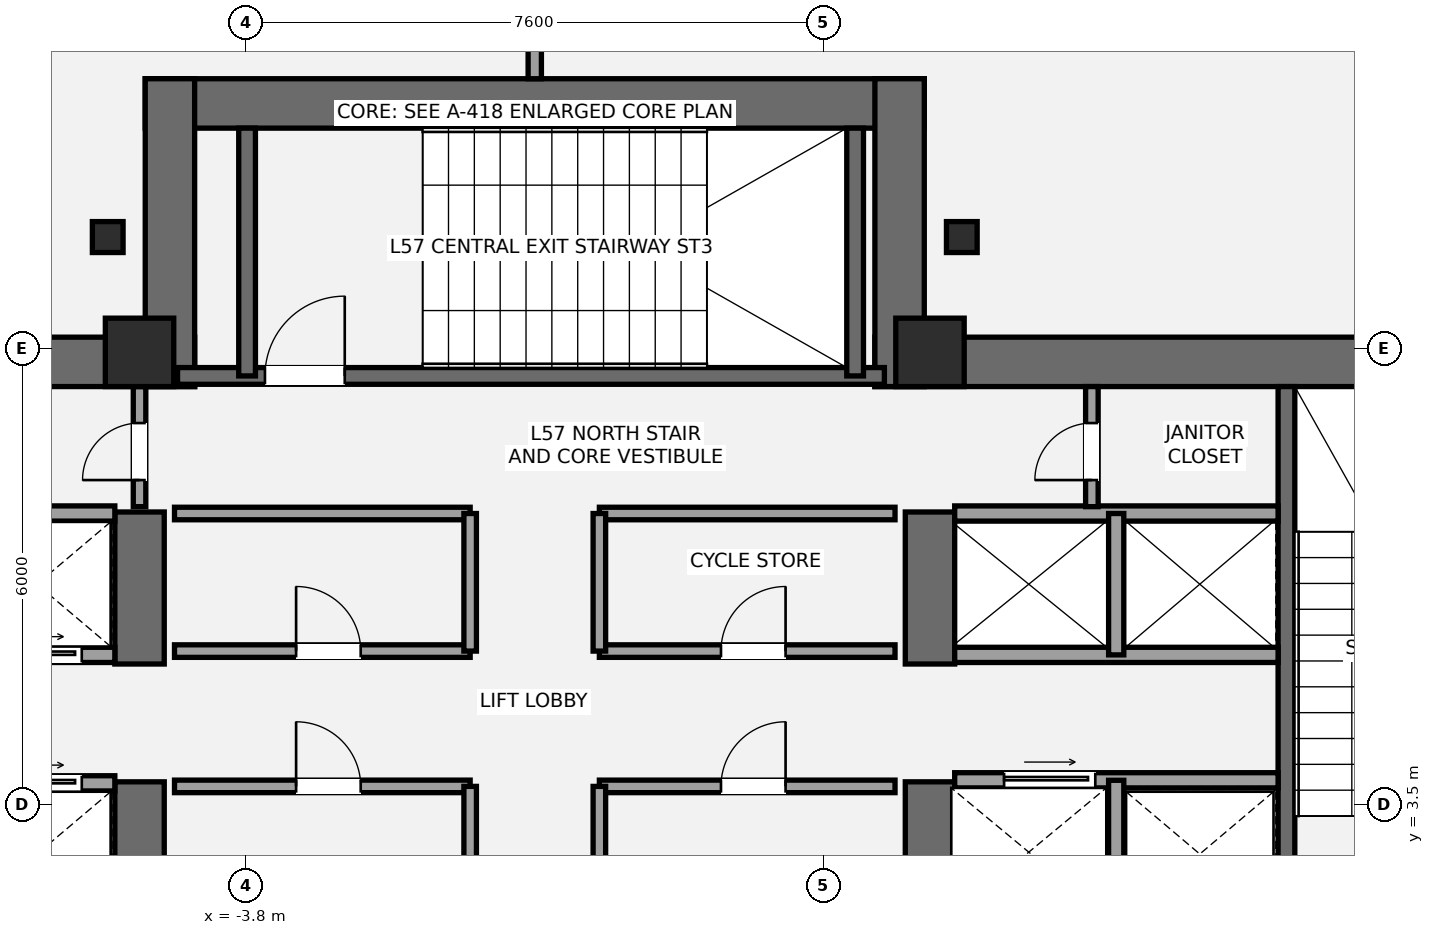
"""IFC4 building model, lengths in metres.
Left out: names, types, materials, properties, quantities, classifications, styles, units other than length and angle.
Written with IfcOpenShell. Run it as: python <this file> out.ifc"""

import sys

from ifc_helpers import new_model, si_unit, direction, frame, frame_2d, origin, origin_2d, place, context, subcontext, project, spatial, rectangle, i_section, extrude, element, fill, save


model = new_model("IFC4")
c1 = context("Model", 3, precision=1e-05, world=origin(), true_north=direction((0.0, 1.0)))
c2 = subcontext(c1, "Body", "Model", "MODEL_VIEW")
j1 = project(units=[si_unit("LENGTHUNIT", "METRE"), si_unit("PLANEANGLEUNIT", "RADIAN")], contexts=[c1])
p1 = place(None, origin())
s1 = spatial("IfcSite", under=j1, at=p1, CompositionType="ELEMENT")
p2 = place(p1, origin())
s2 = spatial("IfcBuilding", under=s1, at=p2, CompositionType="ELEMENT")
p3 = place(p2, frame((0.0, 0.0, 205.9)))
s3 = spatial("IfcBuildingStorey", under=s2, at=p3, CompositionType="ELEMENT", Elevation=205.9)
p4 = place(p3, frame((-13.8, 9.325, 0.0), z_axis=(0.0, 0.0, 1.0), x_axis=(1.0, 0.0, 0.0)))
e1 = element("IfcWall", 1, at=p4, inside=s3, PredefinedType="SHEAR", context=c2, shape_type="SweptSolid", body=[
    extrude(rectangle(XDim=9.325, YDim=0.65, at=frame_2d((4.663, 0.0))), origin(), (0.0, 0.0, 1.0), 4.1),
])
p5 = place(p3, frame((-5.2, 1.2, 0.0), z_axis=(0.0, 0.0, 1.0), x_axis=(0.0, 1.0, 0.0)))
e2 = element("IfcWall", 2, at=p5, inside=s3, PredefinedType="SHEAR", context=c2, shape_type="SweptSolid", body=[
    extrude(rectangle(XDim=2.6, YDim=0.65, at=frame_2d((1.3, 0.0))), origin(), (0.0, 0.0, 1.0), 4.1),
])
p6 = place(p3, frame((-5.2, 5.35, 0.0), z_axis=(0.0, 0.0, 1.0), x_axis=(0.0, 1.0, 0.0)))
e3 = element("IfcWall", 3, at=p6, inside=s3, PredefinedType="SHEAR", context=c2, shape_type="SweptSolid", body=[
    extrude(rectangle(XDim=2.0, YDim=0.65, at=frame_2d((1.0, 0.0))), origin(), (0.0, 0.0, 1.0), 4.1),
])
p7 = place(p3, frame((4.475, 9.325, 0.0), z_axis=(0.0, 0.0, 1.0), x_axis=(1.0, 0.0, 0.0)))
e4 = element("IfcWall", 4, at=p7, inside=s3, PredefinedType="SHEAR", context=c2, shape_type="SweptSolid", body=[
    extrude(rectangle(XDim=9.325, YDim=0.65, at=frame_2d((4.663, 0.0))), origin(), (0.0, 0.0, 1.0), 4.1),
])
p8 = place(p3, frame((5.2, 1.2, 0.0), z_axis=(0.0, 0.0, 1.0), x_axis=(0.0, 1.0, 0.0)))
e5 = element("IfcWall", 5, at=p8, inside=s3, PredefinedType="SHEAR", context=c2, shape_type="SweptSolid", body=[
    extrude(rectangle(XDim=2.6, YDim=0.65, at=frame_2d((1.3, 0.0))), origin(), (0.0, 0.0, 1.0), 4.1),
])
p9 = place(p3, frame((5.2, 5.35, 0.0), z_axis=(0.0, 0.0, 1.0), x_axis=(0.0, 1.0, 0.0)))
e6 = element("IfcWall", 6, at=p9, inside=s3, PredefinedType="SHEAR", context=c2, shape_type="SweptSolid", body=[
    extrude(rectangle(XDim=2.0, YDim=0.65, at=frame_2d((1.0, 0.0))), origin(), (0.0, 0.0, 1.0), 4.1),
])
p10 = place(p3, frame((9.89, 1.85, 0.0), z_axis=(0.0, 0.0, 1.0), x_axis=(0.0, 1.0, 0.0)))
e7 = element("IfcWall", 7, at=p10, inside=s3, PredefinedType="SHEAR", context=c2, shape_type="SweptSolid", body=[
    extrude(rectangle(XDim=7.15, YDim=0.22, at=frame_2d((3.575, 0.0))), origin(), (0.0, 0.0, 1.0), 4.1),
])
p11 = place(p3, frame((-5.125, 12.725, 0.0), z_axis=(0.0, 0.0, 1.0), x_axis=(1.0, 0.0, 0.0)))
e8 = element("IfcWall", 8, at=p11, inside=s3, PredefinedType="SHEAR", context=c2, shape_type="SweptSolid", body=[
    extrude(rectangle(XDim=10.25, YDim=0.65, at=frame_2d((5.125, 0.0))), origin(), (0.0, 0.0, 1.0), 4.1),
])
for number, where, z_axis, x_axis in (
    (9, (-4.8, 9.0, 0.0), (0.0, 0.0, 1.0), (0.0, 1.0, 0.0)),
    (10, (4.8, 9.0, 0.0), (0.0, 0.0, 1.0), (0.0, 1.0, 0.0)),
):
    element("IfcWall", number, at=place(p3, frame(where, z_axis=z_axis, x_axis=x_axis)), inside=s3, PredefinedType="SHEAR", context=c2, shape_type="SweptSolid", body=[
        extrude(rectangle(XDim=4.05, YDim=0.65, at=frame_2d((2.025, 0.0))), origin(), (0.0, 0.0, 1.0), 4.1),
    ])
p12 = place(p3, frame((-4.7, 9.14, 0.0), z_axis=(0.0, 0.0, 1.0), x_axis=(1.0, 0.0, 0.0)))
e11 = element("IfcWall", 11, at=p12, inside=s3, PredefinedType="SHEAR", context=c2, shape_type="SweptSolid", body=[
    extrude(rectangle(XDim=9.3, YDim=0.22, at=frame_2d((4.65, 0.0))), origin(), (0.0, 0.0, 1.0), 4.1),
])
p13 = place(p12, frame((1.15, 0.0, 0.0)))
e12 = element("IfcOpeningElement", 12, at=p13, cuts=e11, PredefinedType="OPENING", context=c2, shape_type="SweptSolid", body=[
    extrude(rectangle(XDim=1.05, YDim=2.15, at=frame_2d((0.525, 1.075))), frame((0.0, 0.12, 0.0), z_axis=(0.0, -1.0, 0.0), x_axis=(1.0, 0.0, 0.0)), (0.0, 0.0, 1.0), 0.24),
])
for number, where, z_axis, x_axis in (
    (13, (-3.785, 9.14, 0.0), (0.0, 0.0, 1.0), (0.0, 1.0, 0.0)),
    (14, (4.215, 9.14, 0.0), (0.0, 0.0, 1.0), (0.0, 1.0, 0.0)),
):
    element("IfcWall", number, at=place(p3, frame(where, z_axis=z_axis, x_axis=x_axis)), inside=s3, PredefinedType="SHEAR", context=c2, shape_type="SweptSolid", body=[
        extrude(rectangle(XDim=3.26, YDim=0.22, at=frame_2d((1.63, 0.0))), origin(), (0.0, 0.0, 1.0), 4.1),
    ])
for number, where, z_axis, x_axis in (
    (15, (-5.2, 9.45, 0.0), (0.0, 0.0, 1.0), (1.0, 0.0, 0.0)),
    (16, (5.2, 9.45, 0.0), (0.0, 0.0, 1.0), (1.0, 0.0, 0.0)),
):
    element("IfcColumn", number, at=place(p3, frame(where, z_axis=z_axis, x_axis=x_axis)), inside=s3, PredefinedType="COLUMN", context=c2, shape_type="SweptSolid", body=[
        extrude(rectangle(XDim=0.9, YDim=0.9, at=origin_2d()), origin(), (0.0, 0.0, 1.0), 4.1),
    ])
for number, where, z_axis, x_axis in (
    (17, (5.619, 10.967, 0.0), (0.0, 0.0, 1.0), (1.0, 0.0, 0.0)),
    (18, (-5.619, 10.967, 0.0), (0.0, 0.0, 1.0), (1.0, 0.0, 0.0)),
):
    element("IfcColumn", number, at=place(p3, frame(where, z_axis=z_axis, x_axis=x_axis)), inside=s3, PredefinedType="COLUMN", context=c2, shape_type="SweptSolid", body=[
        extrude(i_section(OverallWidth=0.404, OverallDepth=0.407, WebThickness=0.027, FlangeThickness=0.044, at=origin_2d()), origin(), (0.0, 0.0, 1.0), 4.1),
    ])
p14 = place(p3, frame((-9.78, 3.78, 0.0), z_axis=(0.0, 0.0, 1.0), x_axis=(1.0, 0.0, 0.0)))
e19 = element("IfcWall", 19, at=p14, inside=s3, PredefinedType="SOLIDWALL", context=c2, shape_type="SweptSolid", body=[
    extrude(rectangle(XDim=4.255, YDim=0.2, at=frame_2d((2.127, 0.0))), origin(), (0.0, 0.0, 1.0), 3.92),
])
p15 = place(p14, frame((2.72, 0.0, 0.0)))
e20 = element("IfcOpeningElement", 20, at=p15, cuts=e19, PredefinedType="OPENING", context=c2, shape_type="SweptSolid", body=[
    extrude(rectangle(XDim=1.1, YDim=2.2, at=frame_2d((0.55, 1.1))), frame((0.0, 0.11, 0.0), z_axis=(0.0, -1.0, 0.0), x_axis=(1.0, 0.0, 0.0)), (0.0, 0.0, 1.0), 0.22),
])
p16 = place(p3, frame((-9.78, 5.47, 0.0), z_axis=(0.0, 0.0, 1.0), x_axis=(1.0, 0.0, 0.0)))
e21 = element("IfcWall", 21, at=p16, inside=s3, PredefinedType="SOLIDWALL", context=c2, shape_type="SweptSolid", body=[
    extrude(rectangle(XDim=4.255, YDim=0.2, at=frame_2d((2.127, 0.0))), origin(), (0.0, 0.0, 1.0), 3.92),
])
p17 = place(p16, frame((0.55, 0.0, 0.0)))
e22 = element("IfcOpeningElement", 22, at=p17, cuts=e21, PredefinedType="OPENING", context=c2, shape_type="SweptSolid", body=[
    extrude(rectangle(XDim=1.1, YDim=2.2, at=frame_2d((0.55, 1.1))), frame((0.0, 0.11, 0.0), z_axis=(0.0, -1.0, 0.0), x_axis=(1.0, 0.0, 0.0)), (0.0, 0.0, 1.0), 0.22),
])
p18 = place(p16, frame((2.72, 0.0, 0.0)))
e23 = element("IfcOpeningElement", 23, at=p18, cuts=e21, PredefinedType="OPENING", context=c2, shape_type="SweptSolid", body=[
    extrude(rectangle(XDim=1.1, YDim=2.2, at=frame_2d((0.55, 1.1))), frame((0.0, 0.11, 0.0), z_axis=(0.0, -1.0, 0.0), x_axis=(1.0, 0.0, 0.0)), (0.0, 0.0, 1.0), 0.22),
])
p19 = place(p3, frame((-9.78, 7.33, 0.0), z_axis=(0.0, 0.0, 1.0), x_axis=(1.0, 0.0, 0.0)))
e24 = element("IfcWall", 24, at=p19, inside=s3, PredefinedType="SOLIDWALL", context=c2, shape_type="SweptSolid", body=[
    extrude(rectangle(XDim=4.255, YDim=0.2, at=frame_2d((2.127, 0.0))), origin(), (0.0, 0.0, 1.0), 3.92),
])
p20 = place(p3, frame((5.525, 3.82, 0.0), z_axis=(0.0, 0.0, 1.0), x_axis=(1.0, 0.0, 0.0)))
e25 = element("IfcWall", 25, at=p20, inside=s3, PredefinedType="SOLIDWALL", context=c2, shape_type="SweptSolid", body=[
    extrude(rectangle(XDim=4.255, YDim=0.2, at=frame_2d((2.127, 0.0))), origin(), (0.0, 0.0, 1.0), 3.92),
])
p21 = place(p20, frame((0.65, 0.0, 0.0)))
e26 = element("IfcOpeningElement", 26, at=p21, cuts=e25, PredefinedType="OPENING", context=c2, shape_type="SweptSolid", body=[
    extrude(rectangle(XDim=1.2, YDim=2.2, at=frame_2d((0.6, 1.1))), frame((0.0, 0.11, 0.0), z_axis=(0.0, -1.0, 0.0), x_axis=(1.0, 0.0, 0.0)), (0.0, 0.0, 1.0), 0.22),
])
p22 = place(p3, frame((7.65, 1.85, 0.0), z_axis=(0.0, 0.0, 1.0), x_axis=(0.0, 1.0, 0.0)))
e27 = element("IfcWall", 27, at=p22, inside=s3, PredefinedType="SOLIDWALL", context=c2, shape_type="SweptSolid", body=[
    extrude(rectangle(XDim=1.97, YDim=0.2, at=frame_2d((0.985, 0.0))), origin(), (0.0, 0.0, 1.0), 3.92),
])
for number, where, z_axis, x_axis in (
    (28, (5.525, 5.47, 0.0), (0.0, 0.0, 1.0), (1.0, 0.0, 0.0)),
    (29, (5.525, 7.33, 0.0), (0.0, 0.0, 1.0), (1.0, 0.0, 0.0)),
):
    element("IfcWall", number, at=place(p3, frame(where, z_axis=z_axis, x_axis=x_axis)), inside=s3, PredefinedType="SOLIDWALL", context=c2, shape_type="SweptSolid", body=[
        extrude(rectangle(XDim=4.255, YDim=0.2, at=frame_2d((2.127, 0.0))), origin(), (0.0, 0.0, 1.0), 3.92),
    ])
p23 = place(p3, frame((7.65, 5.47, 0.0), z_axis=(0.0, 0.0, 1.0), x_axis=(0.0, 1.0, 0.0)))
e30 = element("IfcWall", 30, at=p23, inside=s3, PredefinedType="SOLIDWALL", context=c2, shape_type="SweptSolid", body=[
    extrude(rectangle(XDim=1.86, YDim=0.2, at=frame_2d((0.93, 0.0))), origin(), (0.0, 0.0, 1.0), 3.92),
])
p24 = place(p3, frame((-4.74, 3.74, 0.0), z_axis=(0.0, 0.0, 1.0), x_axis=(1.0, 0.0, 0.0)))
e31 = element("IfcWall", 31, at=p24, inside=s3, PredefinedType="PARTITIONING", context=c2, shape_type="SweptSolid", body=[
    extrude(rectangle(XDim=3.89, YDim=0.165, at=frame_2d((1.945, 0.0))), origin(), (0.0, 0.0, 1.0), 3.92),
])
p25 = place(p24, frame((1.6, 0.0, 0.0)))
e32 = element("IfcOpeningElement", 32, at=p25, cuts=e31, PredefinedType="OPENING", context=c2, shape_type="SweptSolid", body=[
    extrude(rectangle(XDim=0.85, YDim=2.1, at=frame_2d((0.425, 1.05))), frame((0.0, 0.093, 0.0), z_axis=(0.0, -1.0, 0.0), x_axis=(1.0, 0.0, 0.0)), (0.0, 0.0, 1.0), 0.185),
])
p26 = place(p3, frame((-0.85, 1.92, 0.0), z_axis=(0.0, 0.0, 1.0), x_axis=(0.0, 1.0, 0.0)))
e33 = element("IfcWall", 33, at=p26, inside=s3, PredefinedType="PARTITIONING", context=c2, shape_type="SweptSolid", body=[
    extrude(rectangle(XDim=1.82, YDim=0.165, at=frame_2d((0.91, 0.0))), origin(), (0.0, 0.0, 1.0), 3.92),
])
p27 = place(p3, frame((0.85, 3.74, 0.0), z_axis=(0.0, 0.0, 1.0), x_axis=(1.0, 0.0, 0.0)))
e34 = element("IfcWall", 34, at=p27, inside=s3, PredefinedType="PARTITIONING", context=c2, shape_type="SweptSolid", body=[
    extrude(rectangle(XDim=3.89, YDim=0.165, at=frame_2d((1.945, 0.0))), origin(), (0.0, 0.0, 1.0), 3.92),
])
p28 = place(p27, frame((1.6, 0.0, 0.0)))
e35 = element("IfcOpeningElement", 35, at=p28, cuts=e34, PredefinedType="OPENING", context=c2, shape_type="SweptSolid", body=[
    extrude(rectangle(XDim=0.85, YDim=2.1, at=frame_2d((0.425, 1.05))), frame((0.0, 0.093, 0.0), z_axis=(0.0, -1.0, 0.0), x_axis=(1.0, 0.0, 0.0)), (0.0, 0.0, 1.0), 0.185),
])
p29 = place(p3, frame((0.85, 1.92, 0.0), z_axis=(0.0, 0.0, 1.0), x_axis=(0.0, 1.0, 0.0)))
e36 = element("IfcWall", 36, at=p29, inside=s3, PredefinedType="PARTITIONING", context=c2, shape_type="SweptSolid", body=[
    extrude(rectangle(XDim=1.82, YDim=0.165, at=frame_2d((0.91, 0.0))), origin(), (0.0, 0.0, 1.0), 3.92),
])
p30 = place(p3, frame((-4.74, 5.52, 0.0), z_axis=(0.0, 0.0, 1.0), x_axis=(1.0, 0.0, 0.0)))
e37 = element("IfcWall", 37, at=p30, inside=s3, PredefinedType="PARTITIONING", context=c2, shape_type="SweptSolid", body=[
    extrude(rectangle(XDim=3.89, YDim=0.165, at=frame_2d((1.945, 0.0))), origin(), (0.0, 0.0, 1.0), 3.92),
])
p31 = place(p30, frame((1.6, 0.0, 0.0)))
e38 = element("IfcOpeningElement", 38, at=p31, cuts=e37, PredefinedType="OPENING", context=c2, shape_type="SweptSolid", body=[
    extrude(rectangle(XDim=0.85, YDim=2.1, at=frame_2d((0.425, 1.05))), frame((0.0, 0.093, 0.0), z_axis=(0.0, -1.0, 0.0), x_axis=(1.0, 0.0, 0.0)), (0.0, 0.0, 1.0), 0.185),
])
p32 = place(p3, frame((-4.74, 7.33, 0.0), z_axis=(0.0, 0.0, 1.0), x_axis=(1.0, 0.0, 0.0)))
e39 = element("IfcWall", 39, at=p32, inside=s3, PredefinedType="PARTITIONING", context=c2, shape_type="SweptSolid", body=[
    extrude(rectangle(XDim=3.89, YDim=0.165, at=frame_2d((1.945, 0.0))), origin(), (0.0, 0.0, 1.0), 3.92),
])
p33 = place(p3, frame((-0.85, 5.52, 0.0), z_axis=(0.0, 0.0, 1.0), x_axis=(0.0, 1.0, 0.0)))
e40 = element("IfcWall", 40, at=p33, inside=s3, PredefinedType="PARTITIONING", context=c2, shape_type="SweptSolid", body=[
    extrude(rectangle(XDim=1.81, YDim=0.165, at=frame_2d((0.905, 0.0))), origin(), (0.0, 0.0, 1.0), 3.92),
])
p34 = place(p3, frame((0.85, 5.52, 0.0), z_axis=(0.0, 0.0, 1.0), x_axis=(1.0, 0.0, 0.0)))
e41 = element("IfcWall", 41, at=p34, inside=s3, PredefinedType="PARTITIONING", context=c2, shape_type="SweptSolid", body=[
    extrude(rectangle(XDim=3.89, YDim=0.165, at=frame_2d((1.945, 0.0))), origin(), (0.0, 0.0, 1.0), 3.92),
])
p35 = place(p34, frame((1.6, 0.0, 0.0)))
e42 = element("IfcOpeningElement", 42, at=p35, cuts=e41, PredefinedType="OPENING", context=c2, shape_type="SweptSolid", body=[
    extrude(rectangle(XDim=0.85, YDim=2.1, at=frame_2d((0.425, 1.05))), frame((0.0, 0.093, 0.0), z_axis=(0.0, -1.0, 0.0), x_axis=(1.0, 0.0, 0.0)), (0.0, 0.0, 1.0), 0.185),
])
p36 = place(p3, frame((0.85, 7.33, 0.0), z_axis=(0.0, 0.0, 1.0), x_axis=(1.0, 0.0, 0.0)))
e43 = element("IfcWall", 43, at=p36, inside=s3, PredefinedType="PARTITIONING", context=c2, shape_type="SweptSolid", body=[
    extrude(rectangle(XDim=3.89, YDim=0.165, at=frame_2d((1.945, 0.0))), origin(), (0.0, 0.0, 1.0), 3.92),
])
p37 = place(p3, frame((0.85, 5.52, 0.0), z_axis=(0.0, 0.0, 1.0), x_axis=(0.0, 1.0, 0.0)))
e44 = element("IfcWall", 44, at=p37, inside=s3, PredefinedType="PARTITIONING", context=c2, shape_type="SweptSolid", body=[
    extrude(rectangle(XDim=1.81, YDim=0.165, at=frame_2d((0.905, 0.0))), origin(), (0.0, 0.0, 1.0), 3.92),
])
p38 = place(p3, frame((-5.2, 7.42, 0.0), z_axis=(0.0, 0.0, 1.0), x_axis=(0.0, 1.0, 0.0)))
e45 = element("IfcWall", 45, at=p38, inside=s3, PredefinedType="PARTITIONING", context=c2, shape_type="SweptSolid", body=[
    extrude(rectangle(XDim=1.58, YDim=0.165, at=frame_2d((0.79, 0.0))), origin(), (0.0, 0.0, 1.0), 3.92),
])
p39 = place(p38, frame((0.35, 0.0, 0.0)))
e46 = element("IfcOpeningElement", 46, at=p39, cuts=e45, PredefinedType="OPENING", context=c2, shape_type="SweptSolid", body=[
    extrude(rectangle(XDim=0.75, YDim=2.1, at=frame_2d((0.375, 1.05))), frame((0.0, 0.093, 0.0), z_axis=(0.0, -1.0, 0.0), x_axis=(1.0, 0.0, 0.0)), (0.0, 0.0, 1.0), 0.185),
])
p40 = place(p3, frame((7.33, 7.42, 0.0), z_axis=(0.0, 0.0, 1.0), x_axis=(0.0, 1.0, 0.0)))
e47 = element("IfcWall", 47, at=p40, inside=s3, PredefinedType="PARTITIONING", context=c2, shape_type="SweptSolid", body=[
    extrude(rectangle(XDim=1.58, YDim=0.165, at=frame_2d((0.79, 0.0))), origin(), (0.0, 0.0, 1.0), 3.92),
])
p41 = place(p40, frame((0.35, 0.0, 0.0)))
e48 = element("IfcOpeningElement", 48, at=p41, cuts=e47, PredefinedType="OPENING", context=c2, shape_type="SweptSolid", body=[
    extrude(rectangle(XDim=0.75, YDim=2.1, at=frame_2d((0.375, 1.05))), frame((0.0, 0.093, 0.0), z_axis=(0.0, -1.0, 0.0), x_axis=(1.0, 0.0, 0.0)), (0.0, 0.0, 1.0), 0.185),
])
p42 = place(p3, frame((0.0, 13.05, 0.0), z_axis=(0.0, 0.0, 1.0), x_axis=(0.0, 1.0, 0.0)))
e49 = element("IfcWall", 49, at=p42, inside=s3, PredefinedType="PARTITIONING", context=c2, shape_type="SweptSolid", body=[
    extrude(rectangle(XDim=2.226, YDim=0.175, at=frame_2d((1.113, 0.0))), origin(), (0.0, 0.0, 1.0), 3.92),
])
p43 = place(p13, origin())
e50 = element("IfcDoor", 50, at=p43, inside=s3, OperationType="SINGLE_SWING_RIGHT", PredefinedType="DOOR", context=c2, shape_type="SweptSolid", body=[
    extrude(rectangle(XDim=1.05, YDim=2.15, at=frame_2d((0.525, 1.075))), frame((0.0, 0.025, 0.0), z_axis=(0.0, -1.0, 0.0), x_axis=(1.0, 0.0, 0.0)), (0.0, 0.0, 1.0), 0.05),
])
fill(e12, e50)
p44 = place(p18, origin())
e51 = element("IfcDoor", 51, at=p44, inside=s3, OperationType="SLIDING_TO_LEFT", PredefinedType="DOOR", context=c2, shape_type="SweptSolid", body=[
    extrude(rectangle(XDim=1.1, YDim=2.2, at=frame_2d((0.55, 1.1))), frame((0.0, 0.025, 0.0), z_axis=(0.0, -1.0, 0.0), x_axis=(1.0, 0.0, 0.0)), (0.0, 0.0, 1.0), 0.05),
])
fill(e23, e51)
p45 = place(p15, origin())
e52 = element("IfcDoor", 52, at=p45, inside=s3, OperationType="SLIDING_TO_LEFT", PredefinedType="DOOR", context=c2, shape_type="SweptSolid", body=[
    extrude(rectangle(XDim=1.1, YDim=2.2, at=frame_2d((0.55, 1.1))), frame((0.0, 0.025, 0.0), z_axis=(0.0, -1.0, 0.0), x_axis=(1.0, 0.0, 0.0)), (0.0, 0.0, 1.0), 0.05),
])
fill(e20, e52)
p46 = place(p21, origin())
e53 = element("IfcDoor", 53, at=p46, inside=s3, OperationType="SLIDING_TO_RIGHT", PredefinedType="DOOR", context=c2, shape_type="SweptSolid", body=[
    extrude(rectangle(XDim=1.2, YDim=2.2, at=frame_2d((0.6, 1.1))), frame((0.0, 0.025, 0.0), z_axis=(0.0, -1.0, 0.0), x_axis=(1.0, 0.0, 0.0)), (0.0, 0.0, 1.0), 0.05),
])
fill(e26, e53)
p47 = place(p25, origin())
e54 = element("IfcDoor", 54, at=p47, inside=s3, OperationType="SINGLE_SWING_LEFT", PredefinedType="DOOR", context=c2, shape_type="SweptSolid", body=[
    extrude(rectangle(XDim=0.85, YDim=2.1, at=frame_2d((0.425, 1.05))), frame((0.0, 0.025, 0.0), z_axis=(0.0, -1.0, 0.0), x_axis=(1.0, 0.0, 0.0)), (0.0, 0.0, 1.0), 0.05),
])
fill(e32, e54)
p48 = place(p28, origin())
e55 = element("IfcDoor", 55, at=p48, inside=s3, OperationType="SINGLE_SWING_RIGHT", PredefinedType="DOOR", context=c2, shape_type="SweptSolid", body=[
    extrude(rectangle(XDim=0.85, YDim=2.1, at=frame_2d((0.425, 1.05))), frame((0.0, 0.025, 0.0), z_axis=(0.0, -1.0, 0.0), x_axis=(1.0, 0.0, 0.0)), (0.0, 0.0, 1.0), 0.05),
])
fill(e35, e55)
p49 = place(p31, origin())
e56 = element("IfcDoor", 56, at=p49, inside=s3, OperationType="SINGLE_SWING_LEFT", PredefinedType="DOOR", context=c2, shape_type="SweptSolid", body=[
    extrude(rectangle(XDim=0.85, YDim=2.1, at=frame_2d((0.425, 1.05))), frame((0.0, 0.025, 0.0), z_axis=(0.0, -1.0, 0.0), x_axis=(1.0, 0.0, 0.0)), (0.0, 0.0, 1.0), 0.05),
])
fill(e38, e56)
p50 = place(p35, origin())
e57 = element("IfcDoor", 57, at=p50, inside=s3, OperationType="SINGLE_SWING_RIGHT", PredefinedType="DOOR", context=c2, shape_type="SweptSolid", body=[
    extrude(rectangle(XDim=0.85, YDim=2.1, at=frame_2d((0.425, 1.05))), frame((0.0, 0.025, 0.0), z_axis=(0.0, -1.0, 0.0), x_axis=(1.0, 0.0, 0.0)), (0.0, 0.0, 1.0), 0.05),
])
fill(e42, e57)
p51 = place(p39, origin())
e58 = element("IfcDoor", 58, at=p51, inside=s3, OperationType="SINGLE_SWING_LEFT", PredefinedType="DOOR", context=c2, shape_type="SweptSolid", body=[
    extrude(rectangle(XDim=0.75, YDim=2.1, at=frame_2d((0.375, 1.05))), frame((0.0, 0.025, 0.0), z_axis=(0.0, -1.0, 0.0), x_axis=(1.0, 0.0, 0.0)), (0.0, 0.0, 1.0), 0.05),
])
fill(e46, e58)
p52 = place(p41, origin())
e59 = element("IfcDoor", 59, at=p52, inside=s3, OperationType="SINGLE_SWING_LEFT", PredefinedType="DOOR", context=c2, shape_type="SweptSolid", body=[
    extrude(rectangle(XDim=0.75, YDim=2.1, at=frame_2d((0.375, 1.05))), frame((0.0, 0.025, 0.0), z_axis=(0.0, -1.0, 0.0), x_axis=(1.0, 0.0, 0.0)), (0.0, 0.0, 1.0), 0.05),
])
fill(e48, e59)
save(model, sys.argv[1])
